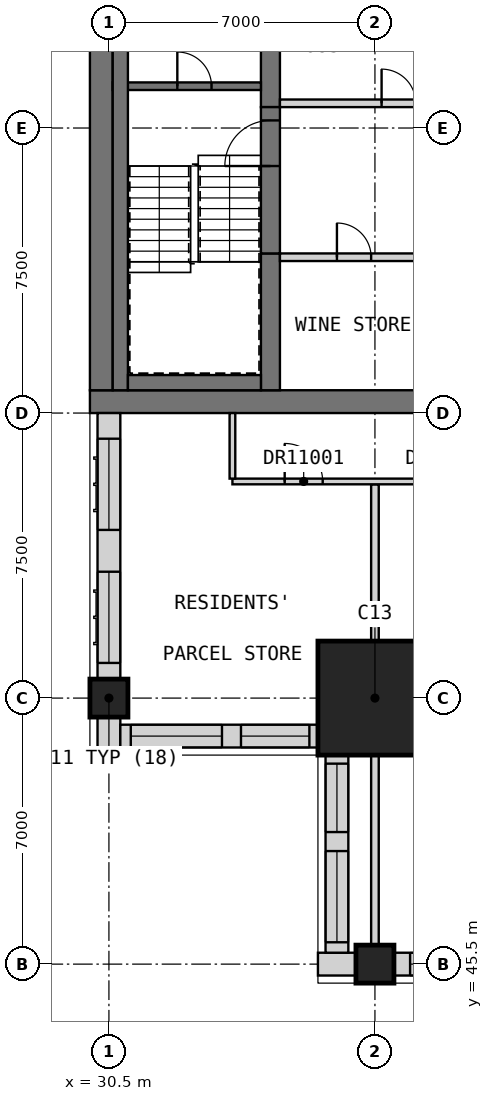
"""IFC4 building model, lengths in metres.
Left out: names, types, materials, properties, quantities, classifications, styles, units other than length and angle.
Written with IfcOpenShell. Run it as: python <this file> out.ifc"""

import sys

from ifc_helpers import new_model, si_unit, direction, frame, frame_2d, origin, origin_2d, place, context, subcontext, project, spatial, rectangle, extrude, element, fill, save


model = new_model("IFC4")
c1 = context("Model", 3, precision=1e-05, world=origin(), true_north=direction((0.0, 1.0)))
c2 = subcontext(c1, "Body", "Model", "MODEL_VIEW")
j1 = project(units=[si_unit("LENGTHUNIT", "METRE"), si_unit("PLANEANGLEUNIT", "RADIAN")], contexts=[c1])
p1 = place(None, origin())
s1 = spatial("IfcSite", under=j1, at=p1, CompositionType="ELEMENT")
p2 = place(p1, origin())
s2 = spatial("IfcBuilding", under=s1, at=p2, CompositionType="ELEMENT")
p3 = place(p2, frame((0.0, 0.0, 276.7)))
s3 = spatial("IfcBuildingStorey", under=s2, at=p3, CompositionType="ELEMENT", Elevation=276.7)
for number, where, z_axis, x_axis in (
    (1, (30.5, 52.5, 0.0), (0.0, 0.0, 1.0), (1.0, 0.0, 0.0)),
    (2, (37.5, 45.5, 0.0), (0.0, 0.0, 1.0), (1.0, 0.0, 0.0)),
):
    element("IfcColumn", number, at=place(p3, frame(where, z_axis=z_axis, x_axis=x_axis)), inside=s3, PredefinedType="COLUMN", context=c2, shape_type="SweptSolid", body=[
        extrude(rectangle(XDim=1.0, YDim=1.0, at=origin_2d()), origin(), (0.0, 0.0, 1.0), 3.5),
    ])
p4 = place(p3, frame((37.5, 52.5, 0.0), z_axis=(0.0, 0.0, 1.0), x_axis=(1.0, 0.0, 0.0)))
e3 = element("IfcColumn", 3, at=p4, inside=s3, PredefinedType="COLUMN", context=c2, shape_type="SweptSolid", body=[
    extrude(rectangle(XDim=3.0, YDim=3.0, at=origin_2d()), origin(), (0.0, 0.0, 1.0), 3.5),
])
p5 = place(p3, frame((30.0, 60.3, 0.0), z_axis=(0.0, 0.0, 1.0), x_axis=(1.0, 0.0, 0.0)))
e4 = element("IfcWall", 4, at=p5, inside=s3, PredefinedType="SHEAR", context=c2, shape_type="SweptSolid", body=[
    extrude(rectangle(XDim=30.0, YDim=0.6, at=frame_2d((15.0, 0.0))), origin(), (0.0, 0.0, 1.0), 3.5),
])
p6 = place(p5, frame((21.9, 0.0, 0.0)))
e5 = element("IfcOpeningElement", 5, at=p6, cuts=e4, PredefinedType="OPENING", context=c2, shape_type="SweptSolid", body=[
    extrude(rectangle(XDim=1.8, YDim=2.1, at=frame_2d((0.9, 1.05))), frame((0.0, 0.31, 0.0), z_axis=(0.0, -1.0, 0.0), x_axis=(1.0, 0.0, 0.0)), (0.0, 0.0, 1.0), 0.62),
])
p7 = place(p5, frame((26.5, 0.0, 0.0)))
e6 = element("IfcOpeningElement", 6, at=p7, cuts=e4, PredefinedType="OPENING", context=c2, shape_type="SweptSolid", body=[
    extrude(rectangle(XDim=1.2, YDim=2.1, at=frame_2d((0.6, 1.05))), frame((0.0, 0.31, 0.0), z_axis=(0.0, -1.0, 0.0), x_axis=(1.0, 0.0, 0.0)), (0.0, 0.0, 1.0), 0.62),
])
p8 = place(p3, frame((30.3, 60.6, 0.0), z_axis=(0.0, 0.0, 1.0), x_axis=(0.0, 1.0, 0.0)))
e7 = element("IfcWall", 7, at=p8, inside=s3, PredefinedType="SHEAR", context=c2, shape_type="SweptSolid", body=[
    extrude(rectangle(XDim=21.3, YDim=0.6, at=frame_2d((10.65, 0.0))), origin(), (0.0, 0.0, 1.0), 3.5),
])
p9 = place(p3, frame((34.75, 60.6, 0.0), z_axis=(0.0, 0.0, 1.0), x_axis=(0.0, 1.0, 0.0)))
e8 = element("IfcWall", 8, at=p9, inside=s3, PredefinedType="SHEAR", context=c2, shape_type="SweptSolid", body=[
    extrude(rectangle(XDim=3.6, YDim=0.5, at=frame_2d((1.8, 0.0))), origin(), (0.0, 0.0, 1.0), 3.5),
])
p10 = place(p3, frame((34.75, 68.05, 0.0), z_axis=(0.0, 0.0, 1.0), x_axis=(0.0, 1.0, 0.0)))
e9 = element("IfcWall", 9, at=p10, inside=s3, PredefinedType="SHEAR", context=c2, shape_type="SweptSolid", body=[
    extrude(rectangle(XDim=6.4, YDim=0.5, at=frame_2d((3.2, 0.0))), origin(), (0.0, 0.0, 1.0), 3.5),
])
p11 = place(p2, frame((0.0, 0.0, 34.0)))
s4 = spatial("IfcBuildingStorey", under=s2, at=p11, CompositionType="ELEMENT", Elevation=34.0)
for number, where, z_axis, x_axis in (
    (10, (29.7, 61.05, 0.0), (0.0, 0.0, 1.0), (0.0, 1.0, 0.0)),
    (11, (29.7, 65.925, 0.0), (0.0, 0.0, 1.0), (0.0, 1.0, 0.0)),
):
    element("IfcWall", number, at=place(p11, frame(where, z_axis=z_axis, x_axis=x_axis)), inside=s4, PredefinedType="SOLIDWALL", context=c2, shape_type="SweptSolid", body=[
        extrude(rectangle(XDim=0.9, YDim=0.6, at=frame_2d((0.45, 0.0))), origin(), (0.0, 0.0, 1.0), 286.2),
    ])
p12 = place(p3, frame((36.0, 45.5, 0.0), z_axis=(0.0, 0.0, 1.0), x_axis=(1.0, 0.0, 0.0)))
e12 = element("IfcWall", 12, at=p12, inside=s3, PredefinedType="SOLIDWALL", context=c2, shape_type="SweptSolid", body=[
    extrude(rectangle(XDim=1.0, YDim=0.6, at=frame_2d((0.5, 0.0))), origin(), (0.0, 0.0, 1.0), 3.25),
])
p13 = place(p3, frame((38.0, 45.5, 0.0), z_axis=(0.0, 0.0, 1.0), x_axis=(1.0, 0.0, 0.0)))
e13 = element("IfcWall", 13, at=p13, inside=s3, PredefinedType="SOLIDWALL", context=c2, shape_type="SweptSolid", body=[
    extrude(rectangle(XDim=6.5, YDim=0.6, at=frame_2d((3.25, 0.0))), origin(), (0.0, 0.0, 1.0), 2.75),
])
p14 = place(p13, frame((0.425, 0.0, 0.8)))
e14 = element("IfcOpeningElement", 14, at=p14, cuts=e13, PredefinedType="OPENING", context=c2, shape_type="SweptSolid", body=[
    extrude(rectangle(XDim=2.4, YDim=1.8, at=frame_2d((1.2, 0.9))), frame((0.0, 0.31, 0.0), z_axis=(0.0, -1.0, 0.0), x_axis=(1.0, 0.0, 0.0)), (0.0, 0.0, 1.0), 0.62),
])
p15 = place(p13, frame((3.675, 0.0, 0.8)))
e15 = element("IfcOpeningElement", 15, at=p15, cuts=e13, PredefinedType="OPENING", context=c2, shape_type="SweptSolid", body=[
    extrude(rectangle(XDim=2.4, YDim=1.8, at=frame_2d((1.2, 0.9))), frame((0.0, 0.31, 0.0), z_axis=(0.0, -1.0, 0.0), x_axis=(1.0, 0.0, 0.0)), (0.0, 0.0, 1.0), 0.62),
])
p16 = place(p3, frame((30.5, 60.0, 0.0), z_axis=(0.0, 0.0, 1.0), x_axis=(0.0, -1.0, 0.0)))
e16 = element("IfcWall", 16, at=p16, inside=s3, PredefinedType="SOLIDWALL", context=c2, shape_type="SweptSolid", body=[
    extrude(rectangle(XDim=7.0, YDim=0.6, at=frame_2d((3.5, 0.0))), origin(), (0.0, 0.0, 1.0), 3.25),
])
p17 = place(p16, frame((4.175, 0.0, 0.8)))
e17 = element("IfcOpeningElement", 17, at=p17, cuts=e16, PredefinedType="OPENING", context=c2, shape_type="SweptSolid", body=[
    extrude(rectangle(XDim=2.4, YDim=1.8, at=frame_2d((1.2, 0.9))), frame((0.0, 0.31, 0.0), z_axis=(0.0, -1.0, 0.0), x_axis=(1.0, 0.0, 0.0)), (0.0, 0.0, 1.0), 0.62),
])
p18 = place(p16, frame((0.675, 0.0, 0.8)))
e18 = element("IfcOpeningElement", 18, at=p18, cuts=e16, PredefinedType="OPENING", context=c2, shape_type="SweptSolid", body=[
    extrude(rectangle(XDim=2.4, YDim=1.8, at=frame_2d((1.2, 0.9))), frame((0.0, 0.31, 0.0), z_axis=(0.0, -1.0, 0.0), x_axis=(1.0, 0.0, 0.0)), (0.0, 0.0, 1.0), 0.62),
])
p19 = place(p3, frame((30.5, 52.0, 0.0), z_axis=(0.0, 0.0, 1.0), x_axis=(0.0, -1.0, 0.0)))
e19 = element("IfcWall", 19, at=p19, inside=s3, PredefinedType="SOLIDWALL", context=c2, shape_type="SweptSolid", body=[
    extrude(rectangle(XDim=1.0, YDim=0.6, at=frame_2d((0.5, 0.0))), origin(), (0.0, 0.0, 1.0), 3.25),
])
p20 = place(p3, frame((30.8, 51.5, 0.0), z_axis=(0.0, 0.0, 1.0), x_axis=(1.0, 0.0, 0.0)))
e20 = element("IfcWall", 20, at=p20, inside=s3, PredefinedType="SOLIDWALL", context=c2, shape_type="SweptSolid", body=[
    extrude(rectangle(XDim=5.2, YDim=0.6, at=frame_2d((2.6, 0.0))), origin(), (0.0, 0.0, 1.0), 3.25),
])
p21 = place(p20, frame((0.275, 0.0, 0.8)))
e21 = element("IfcOpeningElement", 21, at=p21, cuts=e20, PredefinedType="OPENING", context=c2, shape_type="SweptSolid", body=[
    extrude(rectangle(XDim=2.4, YDim=1.8, at=frame_2d((1.2, 0.9))), frame((0.0, 0.31, 0.0), z_axis=(0.0, -1.0, 0.0), x_axis=(1.0, 0.0, 0.0)), (0.0, 0.0, 1.0), 0.62),
])
p22 = place(p20, frame((3.175, 0.0, 0.8)))
e22 = element("IfcOpeningElement", 22, at=p22, cuts=e20, PredefinedType="OPENING", context=c2, shape_type="SweptSolid", body=[
    extrude(rectangle(XDim=1.8, YDim=1.8, at=frame_2d((0.9, 0.9))), frame((0.0, 0.31, 0.0), z_axis=(0.0, -1.0, 0.0), x_axis=(1.0, 0.0, 0.0)), (0.0, 0.0, 1.0), 0.62),
])
p23 = place(p3, frame((36.5, 51.0, 0.0), z_axis=(0.0, 0.0, 1.0), x_axis=(0.0, -1.0, 0.0)))
e23 = element("IfcWall", 23, at=p23, inside=s3, PredefinedType="SOLIDWALL", context=c2, shape_type="SweptSolid", body=[
    extrude(rectangle(XDim=5.2, YDim=0.6, at=frame_2d((2.6, 0.0))), origin(), (0.0, 0.0, 1.0), 3.25),
])
p24 = place(p23, frame((2.525, 0.0, 0.8)))
e24 = element("IfcOpeningElement", 24, at=p24, cuts=e23, PredefinedType="OPENING", context=c2, shape_type="SweptSolid", body=[
    extrude(rectangle(XDim=2.4, YDim=1.8, at=frame_2d((1.2, 0.9))), frame((0.0, 0.31, 0.0), z_axis=(0.0, -1.0, 0.0), x_axis=(1.0, 0.0, 0.0)), (0.0, 0.0, 1.0), 0.62),
])
p25 = place(p23, frame((0.225, 0.0, 0.8)))
e25 = element("IfcOpeningElement", 25, at=p25, cuts=e23, PredefinedType="OPENING", context=c2, shape_type="SweptSolid", body=[
    extrude(rectangle(XDim=1.8, YDim=1.8, at=frame_2d((0.9, 0.9))), frame((0.0, 0.31, 0.0), z_axis=(0.0, -1.0, 0.0), x_axis=(1.0, 0.0, 0.0)), (0.0, 0.0, 1.0), 0.62),
])
p26 = place(p3, frame((35.0, 64.1, 0.0), z_axis=(0.0, 0.0, 1.0), x_axis=(1.0, 0.0, 0.0)))
e26 = element("IfcWall", 26, at=p26, inside=s3, PredefinedType="PARTITIONING", context=c2, shape_type="SweptSolid", body=[
    extrude(rectangle(XDim=15.6, YDim=0.2, at=frame_2d((7.8, 0.0))), origin(), (0.0, 0.0, 1.0), 3.25),
])
p27 = place(p26, frame((1.5, 0.0, 0.0)))
e27 = element("IfcOpeningElement", 27, at=p27, cuts=e26, PredefinedType="OPENING", context=c2, shape_type="SweptSolid", body=[
    extrude(rectangle(XDim=0.9, YDim=2.1, at=frame_2d((0.45, 1.05))), frame((0.0, 0.11, 0.0), z_axis=(0.0, -1.0, 0.0), x_axis=(1.0, 0.0, 0.0)), (0.0, 0.0, 1.0), 0.22),
])
p28 = place(p26, frame((5.4, 0.0, 0.0)))
e28 = element("IfcOpeningElement", 28, at=p28, cuts=e26, PredefinedType="OPENING", context=c2, shape_type="SweptSolid", body=[
    extrude(rectangle(XDim=0.9, YDim=2.1, at=frame_2d((0.45, 1.05))), frame((0.0, 0.11, 0.0), z_axis=(0.0, -1.0, 0.0), x_axis=(1.0, 0.0, 0.0)), (0.0, 0.0, 1.0), 0.22),
])
p29 = place(p26, frame((9.3, 0.0, 0.0)))
e29 = element("IfcOpeningElement", 29, at=p29, cuts=e26, PredefinedType="OPENING", context=c2, shape_type="SweptSolid", body=[
    extrude(rectangle(XDim=0.9, YDim=2.1, at=frame_2d((0.45, 1.05))), frame((0.0, 0.11, 0.0), z_axis=(0.0, -1.0, 0.0), x_axis=(1.0, 0.0, 0.0)), (0.0, 0.0, 1.0), 0.22),
])
p30 = place(p26, frame((13.2, 0.0, 0.0)))
e30 = element("IfcOpeningElement", 30, at=p30, cuts=e26, PredefinedType="OPENING", context=c2, shape_type="SweptSolid", body=[
    extrude(rectangle(XDim=0.9, YDim=2.1, at=frame_2d((0.45, 1.05))), frame((0.0, 0.11, 0.0), z_axis=(0.0, -1.0, 0.0), x_axis=(1.0, 0.0, 0.0)), (0.0, 0.0, 1.0), 0.22),
])
p31 = place(p3, frame((35.0, 68.15, 0.0), z_axis=(0.0, 0.0, 1.0), x_axis=(1.0, 0.0, 0.0)))
e31 = element("IfcWall", 31, at=p31, inside=s3, PredefinedType="PARTITIONING", context=c2, shape_type="SweptSolid", body=[
    extrude(rectangle(XDim=15.6, YDim=0.2, at=frame_2d((7.8, 0.0))), origin(), (0.0, 0.0, 1.0), 3.25),
])
p32 = place(p31, frame((2.675, 0.0, 0.0)))
e32 = element("IfcOpeningElement", 32, at=p32, cuts=e31, PredefinedType="OPENING", context=c2, shape_type="SweptSolid", body=[
    extrude(rectangle(XDim=0.9, YDim=2.1, at=frame_2d((0.45, 1.05))), frame((0.0, 0.11, 0.0), z_axis=(0.0, -1.0, 0.0), x_axis=(1.0, 0.0, 0.0)), (0.0, 0.0, 1.0), 0.22),
])
p33 = place(p31, frame((10.475, 0.0, 0.0)))
e33 = element("IfcOpeningElement", 33, at=p33, cuts=e31, PredefinedType="OPENING", context=c2, shape_type="SweptSolid", body=[
    extrude(rectangle(XDim=0.9, YDim=2.1, at=frame_2d((0.45, 1.05))), frame((0.0, 0.11, 0.0), z_axis=(0.0, -1.0, 0.0), x_axis=(1.0, 0.0, 0.0)), (0.0, 0.0, 1.0), 0.22),
])
p34 = place(p3, frame((34.75, 64.2, 0.0), z_axis=(0.0, 0.0, 1.0), x_axis=(0.0, 1.0, 0.0)))
e34 = element("IfcWall", 34, at=p34, inside=s3, PredefinedType="SOLIDWALL", context=c2, shape_type="SweptSolid", body=[
    extrude(rectangle(XDim=3.85, YDim=0.5, at=frame_2d((1.925, 0.0))), origin(), (0.0, 0.0, 1.0), 2.3),
])
p35 = place(p34, frame((2.3, 0.0, 0.0)))
e35 = element("IfcOpeningElement", 35, at=p35, cuts=e34, PredefinedType="OPENING", context=c2, shape_type="SweptSolid", body=[
    extrude(rectangle(XDim=1.2, YDim=2.1, at=frame_2d((0.6, 1.05))), frame((0.0, 0.26, 0.0), z_axis=(0.0, -1.0, 0.0), x_axis=(1.0, 0.0, 0.0)), (0.0, 0.0, 1.0), 0.52),
])
p36 = place(p3, frame((30.6, 68.6, 0.0), z_axis=(0.0, 0.0, 1.0), x_axis=(1.0, 0.0, 0.0)))
e36 = element("IfcWall", 36, at=p36, inside=s3, PredefinedType="SOLIDWALL", context=c2, shape_type="SweptSolid", body=[
    extrude(rectangle(XDim=3.9, YDim=0.2, at=frame_2d((1.95, 0.0))), origin(), (0.0, 0.0, 1.0), 3.25),
])
p37 = place(p36, frame((1.7, 0.0, 0.0)))
e37 = element("IfcOpeningElement", 37, at=p37, cuts=e36, PredefinedType="OPENING", context=c2, shape_type="SweptSolid", body=[
    extrude(rectangle(XDim=0.9, YDim=2.1, at=frame_2d((0.45, 1.05))), frame((0.0, 0.11, 0.0), z_axis=(0.0, -1.0, 0.0), x_axis=(1.0, 0.0, 0.0)), (0.0, 0.0, 1.0), 0.22),
])
p38 = place(p3, frame((30.8, 60.6, 0.0), z_axis=(0.0, 0.0, 1.0), x_axis=(0.0, 1.0, 0.0)))
e38 = element("IfcWall", 38, at=p38, inside=s3, PredefinedType="SOLIDWALL", context=c2, shape_type="SweptSolid", body=[
    extrude(rectangle(XDim=21.3, YDim=0.4, at=frame_2d((10.65, 0.0))), origin(), (0.0, 0.0, 1.0), 3.25),
])
p39 = place(p3, frame((31.0, 60.8, 0.0), z_axis=(0.0, 0.0, 1.0), x_axis=(1.0, 0.0, 0.0)))
e39 = element("IfcWall", 39, at=p39, inside=s3, PredefinedType="SOLIDWALL", context=c2, shape_type="SweptSolid", body=[
    extrude(rectangle(XDim=3.5, YDim=0.4, at=frame_2d((1.75, 0.0))), origin(), (0.0, 0.0, 1.0), 3.25),
])
p40 = place(p3, frame((37.5, 45.0, 0.0), z_axis=(0.0, 0.0, 1.0), x_axis=(0.0, 1.0, 0.0)))
e40 = element("IfcWall", 40, at=p40, inside=s3, PredefinedType="PARTITIONING", context=c2, shape_type="SweptSolid", body=[
    extrude(rectangle(XDim=13.125, YDim=0.2, at=frame_2d((6.562, 0.0))), origin(), (0.0, 0.0, 1.0), 2.75),
])
p41 = place(p3, frame((33.75, 58.2, 0.0), z_axis=(0.0, 0.0, 1.0), x_axis=(1.0, 0.0, 0.0)))
e41 = element("IfcWall", 41, at=p41, inside=s3, PredefinedType="PARTITIONING", context=c2, shape_type="SweptSolid", body=[
    extrude(rectangle(XDim=28.05, YDim=0.15, at=frame_2d((14.025, 0.0))), origin(), (0.0, 0.0, 1.0), 3.25),
])
p42 = place(p41, frame((1.375, 0.0, 0.0)))
e42 = element("IfcOpeningElement", 42, at=p42, cuts=e41, PredefinedType="OPENING", context=c2, shape_type="SweptSolid", body=[
    extrude(rectangle(XDim=1.0, YDim=2.1, at=frame_2d((0.5, 1.05))), frame((0.0, 0.085, 0.0), z_axis=(0.0, -1.0, 0.0), x_axis=(1.0, 0.0, 0.0)), (0.0, 0.0, 1.0), 0.17),
])
p43 = place(p41, frame((5.175, 0.0, 0.0)))
e43 = element("IfcOpeningElement", 43, at=p43, cuts=e41, PredefinedType="OPENING", context=c2, shape_type="SweptSolid", body=[
    extrude(rectangle(XDim=0.9, YDim=2.1, at=frame_2d((0.45, 1.05))), frame((0.0, 0.085, 0.0), z_axis=(0.0, -1.0, 0.0), x_axis=(1.0, 0.0, 0.0)), (0.0, 0.0, 1.0), 0.17),
])
p44 = place(p41, frame((12.675, 0.0, 0.0)))
e44 = element("IfcOpeningElement", 44, at=p44, cuts=e41, PredefinedType="OPENING", context=c2, shape_type="SweptSolid", body=[
    extrude(rectangle(XDim=0.9, YDim=2.1, at=frame_2d((0.45, 1.05))), frame((0.0, 0.085, 0.0), z_axis=(0.0, -1.0, 0.0), x_axis=(1.0, 0.0, 0.0)), (0.0, 0.0, 1.0), 0.17),
])
p45 = place(p41, frame((20.175, 0.0, 0.0)))
e45 = element("IfcOpeningElement", 45, at=p45, cuts=e41, PredefinedType="OPENING", context=c2, shape_type="SweptSolid", body=[
    extrude(rectangle(XDim=0.9, YDim=2.1, at=frame_2d((0.45, 1.05))), frame((0.0, 0.085, 0.0), z_axis=(0.0, -1.0, 0.0), x_axis=(1.0, 0.0, 0.0)), (0.0, 0.0, 1.0), 0.17),
])
p46 = place(p41, frame((26.65, 0.0, 0.0)))
e46 = element("IfcOpeningElement", 46, at=p46, cuts=e41, PredefinedType="OPENING", context=c2, shape_type="SweptSolid", body=[
    extrude(rectangle(XDim=1.0, YDim=2.1, at=frame_2d((0.5, 1.05))), frame((0.0, 0.085, 0.0), z_axis=(0.0, -1.0, 0.0), x_axis=(1.0, 0.0, 0.0)), (0.0, 0.0, 1.0), 0.17),
])
p47 = place(p3, frame((33.75, 58.275, 0.0), z_axis=(0.0, 0.0, 1.0), x_axis=(0.0, 1.0, 0.0)))
e47 = element("IfcWall", 47, at=p47, inside=s3, PredefinedType="PARTITIONING", context=c2, shape_type="SweptSolid", body=[
    extrude(rectangle(XDim=1.725, YDim=0.15, at=frame_2d((0.863, 0.0))), origin(), (0.0, 0.0, 1.0), 3.25),
])
p48 = place(p3, frame((37.6, 52.5, 0.0), z_axis=(0.0, 0.0, 1.0), x_axis=(1.0, 0.0, 0.0)))
e48 = element("IfcWall", 48, at=p48, inside=s3, PredefinedType="PARTITIONING", context=c2, shape_type="SweptSolid", body=[
    extrude(rectangle(XDim=22.3, YDim=0.1, at=frame_2d((11.15, 0.0))), origin(), (0.0, 0.0, 1.0), 3.25),
])
p49 = place(p48, frame((1.475, 0.0, 0.0)))
e49 = element("IfcOpeningElement", 49, at=p49, cuts=e48, PredefinedType="OPENING", context=c2, shape_type="SweptSolid", body=[
    extrude(rectangle(XDim=0.9, YDim=2.1, at=frame_2d((0.45, 1.05))), frame((0.0, 0.06, 0.0), z_axis=(0.0, -1.0, 0.0), x_axis=(1.0, 0.0, 0.0)), (0.0, 0.0, 1.0), 0.12),
])
p50 = place(p48, frame((8.825, 0.0, 0.0)))
e50 = element("IfcOpeningElement", 50, at=p50, cuts=e48, PredefinedType="OPENING", context=c2, shape_type="SweptSolid", body=[
    extrude(rectangle(XDim=0.9, YDim=2.1, at=frame_2d((0.45, 1.05))), frame((0.0, 0.06, 0.0), z_axis=(0.0, -1.0, 0.0), x_axis=(1.0, 0.0, 0.0)), (0.0, 0.0, 1.0), 0.12),
])
p51 = place(p48, frame((16.325, 0.0, 0.0)))
e51 = element("IfcOpeningElement", 51, at=p51, cuts=e48, PredefinedType="OPENING", context=c2, shape_type="SweptSolid", body=[
    extrude(rectangle(XDim=0.9, YDim=2.1, at=frame_2d((0.45, 1.05))), frame((0.0, 0.06, 0.0), z_axis=(0.0, -1.0, 0.0), x_axis=(1.0, 0.0, 0.0)), (0.0, 0.0, 1.0), 0.12),
])
p52 = place(p14, origin())
e52 = element("IfcWindow", 52, at=p52, inside=s3, PartitioningType="SINGLE_PANEL", PredefinedType="WINDOW", context=c2, shape_type="SweptSolid", body=[
    extrude(rectangle(XDim=2.4, YDim=1.8, at=frame_2d((1.2, 0.9))), frame((0.0, -0.07, 0.0), z_axis=(0.0, -1.0, 0.0), x_axis=(1.0, 0.0, 0.0)), (0.0, 0.0, 1.0), 0.06),
])
fill(e14, e52)
p53 = place(p17, origin())
e53 = element("IfcWindow", 53, at=p53, inside=s3, PartitioningType="SINGLE_PANEL", PredefinedType="WINDOW", context=c2, shape_type="SweptSolid", body=[
    extrude(rectangle(XDim=2.4, YDim=1.8, at=frame_2d((1.2, 0.9))), frame((0.0, -0.07, 0.0), z_axis=(0.0, -1.0, 0.0), x_axis=(1.0, 0.0, 0.0)), (0.0, 0.0, 1.0), 0.06),
])
fill(e17, e53)
p54 = place(p18, origin())
e54 = element("IfcWindow", 54, at=p54, inside=s3, PartitioningType="SINGLE_PANEL", PredefinedType="WINDOW", context=c2, shape_type="SweptSolid", body=[
    extrude(rectangle(XDim=2.4, YDim=1.8, at=frame_2d((1.2, 0.9))), frame((0.0, -0.07, 0.0), z_axis=(0.0, -1.0, 0.0), x_axis=(1.0, 0.0, 0.0)), (0.0, 0.0, 1.0), 0.06),
])
fill(e18, e54)
p55 = place(p21, origin())
e55 = element("IfcWindow", 55, at=p55, inside=s3, PartitioningType="SINGLE_PANEL", PredefinedType="WINDOW", context=c2, shape_type="SweptSolid", body=[
    extrude(rectangle(XDim=2.4, YDim=1.8, at=frame_2d((1.2, 0.9))), frame((0.0, -0.07, 0.0), z_axis=(0.0, -1.0, 0.0), x_axis=(1.0, 0.0, 0.0)), (0.0, 0.0, 1.0), 0.06),
])
fill(e21, e55)
p56 = place(p22, origin())
e56 = element("IfcWindow", 56, at=p56, inside=s3, PartitioningType="SINGLE_PANEL", PredefinedType="WINDOW", context=c2, shape_type="SweptSolid", body=[
    extrude(rectangle(XDim=1.8, YDim=1.8, at=frame_2d((0.9, 0.9))), frame((0.0, -0.07, 0.0), z_axis=(0.0, -1.0, 0.0), x_axis=(1.0, 0.0, 0.0)), (0.0, 0.0, 1.0), 0.06),
])
fill(e22, e56)
p57 = place(p24, origin())
e57 = element("IfcWindow", 57, at=p57, inside=s3, PartitioningType="SINGLE_PANEL", PredefinedType="WINDOW", context=c2, shape_type="SweptSolid", body=[
    extrude(rectangle(XDim=2.4, YDim=1.8, at=frame_2d((1.2, 0.9))), frame((0.0, -0.07, 0.0), z_axis=(0.0, -1.0, 0.0), x_axis=(1.0, 0.0, 0.0)), (0.0, 0.0, 1.0), 0.06),
])
fill(e24, e57)
p58 = place(p25, origin())
e58 = element("IfcWindow", 58, at=p58, inside=s3, PartitioningType="SINGLE_PANEL", PredefinedType="WINDOW", context=c2, shape_type="SweptSolid", body=[
    extrude(rectangle(XDim=1.8, YDim=1.8, at=frame_2d((0.9, 0.9))), frame((0.0, -0.07, 0.0), z_axis=(0.0, -1.0, 0.0), x_axis=(1.0, 0.0, 0.0)), (0.0, 0.0, 1.0), 0.06),
])
fill(e25, e58)
p59 = place(p27, origin())
e59 = element("IfcDoor", 59, at=p59, inside=s3, OperationType="SINGLE_SWING_LEFT", PredefinedType="DOOR", context=c2, shape_type="SweptSolid", body=[
    extrude(rectangle(XDim=0.9, YDim=2.1, at=frame_2d((0.45, 1.05))), frame((0.0, 0.025, 0.0), z_axis=(0.0, -1.0, 0.0), x_axis=(1.0, 0.0, 0.0)), (0.0, 0.0, 1.0), 0.05),
])
fill(e27, e59)
p60 = place(p32, origin())
e60 = element("IfcDoor", 60, at=p60, inside=s3, OperationType="SINGLE_SWING_LEFT", PredefinedType="DOOR", context=c2, shape_type="SweptSolid", body=[
    extrude(rectangle(XDim=0.9, YDim=2.1, at=frame_2d((0.45, 1.05))), frame((0.0, 0.025, 0.0), z_axis=(0.0, -1.0, 0.0), x_axis=(1.0, 0.0, 0.0)), (0.0, 0.0, 1.0), 0.05),
])
fill(e32, e60)
p61 = place(p35, origin())
e61 = element("IfcDoor", 61, at=p61, inside=s3, OperationType="SINGLE_SWING_LEFT", PredefinedType="DOOR", context=c2, shape_type="SweptSolid", body=[
    extrude(rectangle(XDim=1.2, YDim=2.1, at=frame_2d((0.6, 1.05))), frame((0.0, 0.025, 0.0), z_axis=(0.0, -1.0, 0.0), x_axis=(1.0, 0.0, 0.0)), (0.0, 0.0, 1.0), 0.05),
])
fill(e35, e61)
p62 = place(p37, origin())
e62 = element("IfcDoor", 62, at=p62, inside=s3, OperationType="SINGLE_SWING_LEFT", PredefinedType="DOOR", context=c2, shape_type="SweptSolid", body=[
    extrude(rectangle(XDim=0.9, YDim=2.1, at=frame_2d((0.45, 1.05))), frame((0.0, 0.025, 0.0), z_axis=(0.0, -1.0, 0.0), x_axis=(1.0, 0.0, 0.0)), (0.0, 0.0, 1.0), 0.05),
])
fill(e37, e62)
p63 = place(p42, origin())
e63 = element("IfcDoor", 63, at=p63, inside=s3, OperationType="SINGLE_SWING_RIGHT", PredefinedType="DOOR", context=c2, shape_type="SweptSolid", body=[
    extrude(rectangle(XDim=1.0, YDim=2.1, at=frame_2d((0.5, 1.05))), frame((0.0, 0.025, 0.0), z_axis=(0.0, -1.0, 0.0), x_axis=(1.0, 0.0, 0.0)), (0.0, 0.0, 1.0), 0.05),
])
fill(e42, e63)
save(model, sys.argv[1])
